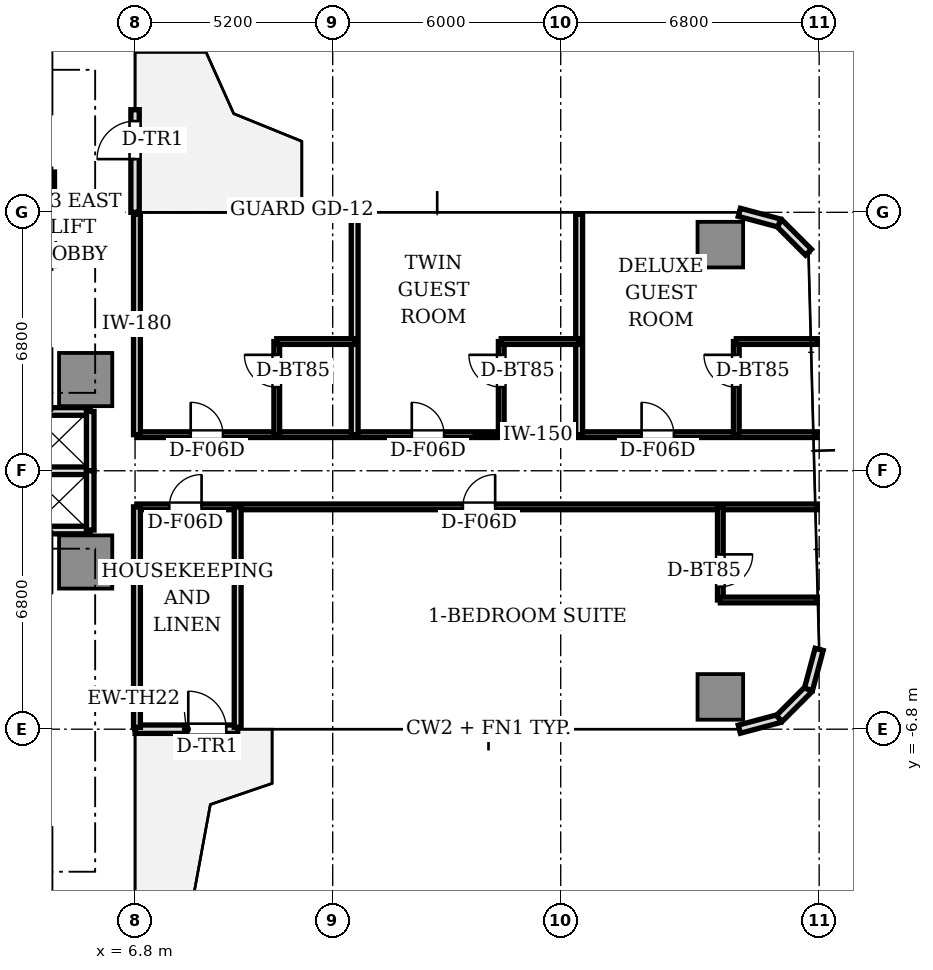
"""IFC4 building model, lengths in metres.
Left out: names, types, materials, properties, quantities, classifications, styles, units other than length and angle.
Written with IfcOpenShell. Run it as: python <this file> out.ifc"""

import sys

from ifc_helpers import new_model, si_unit, direction, frame, frame_2d, origin, origin_2d, place, context, subcontext, project, spatial, rectangle, extrude, source, transform, mapped, element, fill, save


model = new_model("IFC4")
c1 = context("Model", 3, precision=1e-05, world=origin(), true_north=direction((0.0, 1.0)))
c2 = subcontext(c1, "Body", "Model", "MODEL_VIEW")
j1 = project(units=[si_unit("LENGTHUNIT", "METRE"), si_unit("PLANEANGLEUNIT", "RADIAN")], contexts=[c1])
p1 = place(None, origin())
s1 = spatial("IfcSite", under=j1, at=p1, CompositionType="ELEMENT")
p2 = place(p1, origin())
s2 = spatial("IfcBuilding", under=s1, at=p2, CompositionType="ELEMENT")
p3 = place(p2, frame((0.0, 0.0, 51.05)))
s3 = spatial("IfcBuildingStorey", under=s2, at=p3, CompositionType="ELEMENT", Elevation=51.05)
m1 = source(origin(), c2, "Body", "SweptSolid", [
    extrude(rectangle(XDim=1.4, YDim=1.4, at=origin_2d()), origin(), (0.0, 0.0, 1.0), 3.11),
])
for number, where, z_axis, x_axis in (
    (1, (5.5, 2.4, 0.0), (0.0, 0.0, 1.0), (1.0, 0.0, 0.0)),
    (2, (5.5, -2.4, 0.0), (0.0, 0.0, 1.0), (1.0, 0.0, 0.0)),
):
    element("IfcColumn", number, at=place(p3, frame(where, z_axis=z_axis, x_axis=x_axis)), inside=s3, PredefinedType="COLUMN", context=c2, shape_type="MappedRepresentation", body=[
        mapped(m1, transform((0.0, 0.0, 0.0), scale=1.0)),
    ])
m2 = source(origin(), c2, "Body", "SweptSolid", [
    extrude(rectangle(XDim=1.2, YDim=1.2, at=origin_2d()), origin(), (0.0, 0.0, 1.0), 3.11),
])
for number, where, z_axis, x_axis in (
    (3, (22.2, -5.95, 0.0), (0.0, 0.0, 1.0), (1.0, 0.0, 0.0)),
    (4, (22.2, 5.95, 0.0), (0.0, 0.0, 1.0), (1.0, 0.0, 0.0)),
):
    element("IfcColumn", number, at=place(p3, frame(where, z_axis=z_axis, x_axis=x_axis)), inside=s3, PredefinedType="COLUMN", context=c2, shape_type="MappedRepresentation", body=[
        mapped(m2, transform((0.0, 0.0, 0.0), scale=1.0)),
    ])
p4 = place(p3, frame((6.8, -6.8, 0.0), z_axis=(0.0, 0.0, 1.0), x_axis=(1.0, 0.0, 0.0)))
e5 = element("IfcWall", 5, at=p4, inside=s3, PredefinedType="STANDARD", context=c2, shape_type="SweptSolid", body=[
    extrude(rectangle(XDim=2.7, YDim=0.22, at=frame_2d((1.35, 0.0))), origin(), (0.0, 0.0, 1.0), 3.11),
])
p5 = place(p4, frame((1.4, 0.0, 0.0)))
e6 = element("IfcOpeningElement", 6, at=p5, cuts=e5, PredefinedType="OPENING", context=c2, shape_type="SweptSolid", body=[
    extrude(rectangle(XDim=1.0, YDim=2.2, at=frame_2d((0.5, 1.1))), frame((0.0, 0.12, 0.0), z_axis=(0.0, -1.0, 0.0), x_axis=(1.0, 0.0, 0.0)), (0.0, 0.0, 1.0), 0.24),
])
for number, where, z_axis, x_axis in (
    (7, (22.7, -6.8, 0.0), (0.0, 0.0, 1.0), (0.966, 0.259, 0.0)),
    (8, (23.75, -6.519, 0.0), (0.0, 0.0, 1.0), (0.707, 0.707, 0.0)),
    (9, (24.519, -5.75, 0.0), (0.0, 0.0, 1.0), (0.259, 0.966, 0.0)),
    (10, (24.519, 5.75, 0.0), (0.0, 0.0, 1.0), (-0.707, 0.707, 0.0)),
    (11, (23.75, 6.519, 0.0), (0.0, 0.0, 1.0), (-0.966, 0.259, 0.0)),
):
    element("IfcWall", number, at=place(p3, frame(where, z_axis=z_axis, x_axis=x_axis)), inside=s3, PredefinedType="STANDARD", context=c2, shape_type="SweptSolid", body=[
        extrude(rectangle(XDim=1.087, YDim=0.22, at=frame_2d((0.543, 0.0))), origin(), (0.0, 0.0, 1.0), 3.11),
    ])
p6 = place(p3, frame((6.8, 6.8, 0.0), z_axis=(0.0, 0.0, 1.0), x_axis=(0.0, 1.0, 0.0)))
e12 = element("IfcWall", 12, at=p6, inside=s3, PredefinedType="STANDARD", context=c2, shape_type="SweptSolid", body=[
    extrude(rectangle(XDim=2.7, YDim=0.22, at=frame_2d((1.35, 0.0))), origin(), (0.0, 0.0, 1.0), 3.11),
])
p7 = place(p6, frame((1.4, 0.0, 0.0)))
e13 = element("IfcOpeningElement", 13, at=p7, cuts=e12, PredefinedType="OPENING", context=c2, shape_type="SweptSolid", body=[
    extrude(rectangle(XDim=1.0, YDim=2.2, at=frame_2d((0.5, 1.1))), frame((0.0, 0.12, 0.0), z_axis=(0.0, -1.0, 0.0), x_axis=(1.0, 0.0, 0.0)), (0.0, 0.0, 1.0), 0.24),
])
for number, where, z_axis, x_axis in (
    (14, (3.98, 1.56, 0.0), (0.0, 0.0, 1.0), (1.0, 0.0, 0.0)),
    (15, (3.98, -1.56, 0.0), (0.0, 0.0, 1.0), (1.0, 0.0, 0.0)),
    (16, (3.98, 0.0, 0.0), (0.0, 0.0, 1.0), (1.0, 0.0, 0.0)),
):
    element("IfcWall", number, at=place(p3, frame(where, z_axis=z_axis, x_axis=x_axis)), inside=s3, PredefinedType="SOLIDWALL", context=c2, shape_type="SweptSolid", body=[
        extrude(rectangle(XDim=1.64, YDim=0.2, at=frame_2d((0.82, 0.0))), origin(), (0.0, 0.0, 1.0), 2.66),
    ])
for number, where, z_axis, x_axis in (
    (17, (5.62, 0.0, 0.0), (0.0, 0.0, 1.0), (0.0, 1.0, 0.0)),
    (18, (5.62, -1.56, 0.0), (0.0, 0.0, 1.0), (0.0, 1.0, 0.0)),
):
    element("IfcWall", number, at=place(p3, frame(where, z_axis=z_axis, x_axis=x_axis)), inside=s3, PredefinedType="SOLIDWALL", context=c2, shape_type="SweptSolid", body=[
        extrude(rectangle(XDim=1.56, YDim=0.2, at=frame_2d((0.78, 0.0))), origin(), (0.0, 0.0, 1.0), 2.66),
    ])
p8 = place(p3, frame((4.58, 5.4, 0.0), z_axis=(0.0, 0.0, 1.0), x_axis=(0.0, 1.0, 0.0)))
e19 = element("IfcWall", 19, at=p8, inside=s3, PredefinedType="SOLIDWALL", context=c2, shape_type="SweptSolid", body=[
    extrude(rectangle(XDim=2.46, YDim=0.2, at=frame_2d((1.23, 0.0))), origin(), (0.0, 0.0, 1.0), 2.66),
])
p9 = place(p8, frame((0.55, 0.0, 0.0)))
e20 = element("IfcOpeningElement", 20, at=p9, cuts=e19, PredefinedType="OPENING", context=c2, shape_type="SweptSolid", body=[
    extrude(rectangle(XDim=0.85, YDim=2.1, at=frame_2d((0.425, 1.05))), frame((0.0, 0.11, 0.0), z_axis=(0.0, -1.0, 0.0), x_axis=(1.0, 0.0, 0.0)), (0.0, 0.0, 1.0), 0.22),
])
p10 = place(p3, frame((6.85, 0.95, 0.0), z_axis=(0.0, 0.0, 1.0), x_axis=(1.0, 0.0, 0.0)))
e21 = element("IfcWall", 21, at=p10, inside=s3, PredefinedType="PARTITIONING", context=c2, shape_type="SweptSolid", body=[
    extrude(rectangle(XDim=17.9, YDim=0.15, at=frame_2d((8.95, 0.0))), origin(), (0.0, 0.0, 1.0), 2.66),
])
p11 = place(p10, frame((1.414, 0.0, 0.0)))
e22 = element("IfcOpeningElement", 22, at=p11, cuts=e21, PredefinedType="OPENING", context=c2, shape_type="SweptSolid", body=[
    extrude(rectangle(XDim=0.85, YDim=2.1, at=frame_2d((0.425, 1.05))), frame((0.0, 0.085, 0.0), z_axis=(0.0, -1.0, 0.0), x_axis=(1.0, 0.0, 0.0)), (0.0, 0.0, 1.0), 0.17),
])
p12 = place(p10, frame((7.231, 0.0, 0.0)))
e23 = element("IfcOpeningElement", 23, at=p12, cuts=e21, PredefinedType="OPENING", context=c2, shape_type="SweptSolid", body=[
    extrude(rectangle(XDim=0.85, YDim=2.1, at=frame_2d((0.425, 1.05))), frame((0.0, 0.085, 0.0), z_axis=(0.0, -1.0, 0.0), x_axis=(1.0, 0.0, 0.0)), (0.0, 0.0, 1.0), 0.17),
])
p13 = place(p10, frame((13.278, 0.0, 0.0)))
e24 = element("IfcOpeningElement", 24, at=p13, cuts=e21, PredefinedType="OPENING", context=c2, shape_type="SweptSolid", body=[
    extrude(rectangle(XDim=0.85, YDim=2.1, at=frame_2d((0.425, 1.05))), frame((0.0, 0.085, 0.0), z_axis=(0.0, -1.0, 0.0), x_axis=(1.0, 0.0, 0.0)), (0.0, 0.0, 1.0), 0.17),
])
p14 = place(p3, frame((6.85, -0.95, 0.0), z_axis=(0.0, 0.0, 1.0), x_axis=(1.0, 0.0, 0.0)))
e25 = element("IfcWall", 25, at=p14, inside=s3, PredefinedType="PARTITIONING", context=c2, shape_type="SweptSolid", body=[
    extrude(rectangle(XDim=17.9, YDim=0.15, at=frame_2d((8.95, 0.0))), origin(), (0.0, 0.0, 1.0), 2.66),
])
p15 = place(p14, frame((0.85, 0.0, 0.0)))
e26 = element("IfcOpeningElement", 26, at=p15, cuts=e25, PredefinedType="OPENING", context=c2, shape_type="SweptSolid", body=[
    extrude(rectangle(XDim=0.85, YDim=2.1, at=frame_2d((0.425, 1.05))), frame((0.0, 0.085, 0.0), z_axis=(0.0, -1.0, 0.0), x_axis=(1.0, 0.0, 0.0)), (0.0, 0.0, 1.0), 0.17),
])
p16 = place(p14, frame((8.575, 0.0, 0.0)))
e27 = element("IfcOpeningElement", 27, at=p16, cuts=e25, PredefinedType="OPENING", context=c2, shape_type="SweptSolid", body=[
    extrude(rectangle(XDim=0.85, YDim=2.1, at=frame_2d((0.425, 1.05))), frame((0.0, 0.085, 0.0), z_axis=(0.0, -1.0, 0.0), x_axis=(1.0, 0.0, 0.0)), (0.0, 0.0, 1.0), 0.17),
])
for number, where, z_axis, x_axis in (
    (28, (6.85, 0.95, 0.0), (0.0, 0.0, 1.0), (0.0, 1.0, 0.0)),
    (29, (6.85, -6.75, 0.0), (0.0, 0.0, 1.0), (0.0, 1.0, 0.0)),
    (30, (12.578, 0.95, 0.0), (0.0, 0.0, 1.0), (0.0, 1.0, 0.0)),
):
    element("IfcWall", number, at=place(p3, frame(where, z_axis=z_axis, x_axis=x_axis)), inside=s3, PredefinedType="PARTITIONING", context=c2, shape_type="SweptSolid", body=[
        extrude(rectangle(XDim=5.8, YDim=0.18, at=frame_2d((2.9, 0.0))), origin(), (0.0, 0.0, 1.0), 2.66),
    ])
p17 = place(p3, frame((10.528, 0.95, 0.0), z_axis=(0.0, 0.0, 1.0), x_axis=(0.0, 1.0, 0.0)))
e31 = element("IfcWall", 31, at=p17, inside=s3, PredefinedType="PARTITIONING", context=c2, shape_type="SweptSolid", body=[
    extrude(rectangle(XDim=2.45, YDim=0.15, at=frame_2d((1.225, 0.0))), origin(), (0.0, 0.0, 1.0), 2.66),
])
p18 = place(p17, frame((1.25, 0.0, 0.0)))
e32 = element("IfcOpeningElement", 32, at=p18, cuts=e31, PredefinedType="OPENING", context=c2, shape_type="SweptSolid", body=[
    extrude(rectangle(XDim=0.85, YDim=2.1, at=frame_2d((0.425, 1.05))), frame((0.0, 0.085, 0.0), z_axis=(0.0, -1.0, 0.0), x_axis=(1.0, 0.0, 0.0)), (0.0, 0.0, 1.0), 0.17),
])
p19 = place(p3, frame((10.528, 3.4, 0.0), z_axis=(0.0, 0.0, 1.0), x_axis=(1.0, 0.0, 0.0)))
e33 = element("IfcWall", 33, at=p19, inside=s3, PredefinedType="PARTITIONING", context=c2, shape_type="SweptSolid", body=[
    extrude(rectangle(XDim=2.05, YDim=0.15, at=frame_2d((1.025, 0.0))), origin(), (0.0, 0.0, 1.0), 2.63),
])
p20 = place(p3, frame((18.485, 0.95, 0.0), z_axis=(0.0, 0.0, 1.0), x_axis=(0.0, 1.0, 0.0)))
e34 = element("IfcWall", 34, at=p20, inside=s3, PredefinedType="PARTITIONING", context=c2, shape_type="SweptSolid", body=[
    extrude(rectangle(XDim=5.8, YDim=0.18, at=frame_2d((2.9, 0.0))), origin(), (0.0, 0.0, 1.0), 2.66),
])
p21 = place(p3, frame((16.435, 0.95, 0.0), z_axis=(0.0, 0.0, 1.0), x_axis=(0.0, 1.0, 0.0)))
e35 = element("IfcWall", 35, at=p21, inside=s3, PredefinedType="PARTITIONING", context=c2, shape_type="SweptSolid", body=[
    extrude(rectangle(XDim=2.45, YDim=0.15, at=frame_2d((1.225, 0.0))), origin(), (0.0, 0.0, 1.0), 2.66),
])
p22 = place(p21, frame((1.25, 0.0, 0.0)))
e36 = element("IfcOpeningElement", 36, at=p22, cuts=e35, PredefinedType="OPENING", context=c2, shape_type="SweptSolid", body=[
    extrude(rectangle(XDim=0.85, YDim=2.1, at=frame_2d((0.425, 1.05))), frame((0.0, 0.085, 0.0), z_axis=(0.0, -1.0, 0.0), x_axis=(1.0, 0.0, 0.0)), (0.0, 0.0, 1.0), 0.17),
])
p23 = place(p3, frame((16.435, 3.4, 0.0), z_axis=(0.0, 0.0, 1.0), x_axis=(1.0, 0.0, 0.0)))
e37 = element("IfcWall", 37, at=p23, inside=s3, PredefinedType="PARTITIONING", context=c2, shape_type="SweptSolid", body=[
    extrude(rectangle(XDim=2.05, YDim=0.15, at=frame_2d((1.025, 0.0))), origin(), (0.0, 0.0, 1.0), 2.63),
])
p24 = place(p3, frame((22.62, 0.95, 0.0), z_axis=(0.0, 0.0, 1.0), x_axis=(0.0, 1.0, 0.0)))
e38 = element("IfcWall", 38, at=p24, inside=s3, PredefinedType="PARTITIONING", context=c2, shape_type="SweptSolid", body=[
    extrude(rectangle(XDim=2.45, YDim=0.15, at=frame_2d((1.225, 0.0))), origin(), (0.0, 0.0, 1.0), 2.66),
])
p25 = place(p24, frame((1.25, 0.0, 0.0)))
e39 = element("IfcOpeningElement", 39, at=p25, cuts=e38, PredefinedType="OPENING", context=c2, shape_type="SweptSolid", body=[
    extrude(rectangle(XDim=0.85, YDim=2.1, at=frame_2d((0.425, 1.05))), frame((0.0, 0.085, 0.0), z_axis=(0.0, -1.0, 0.0), x_axis=(1.0, 0.0, 0.0)), (0.0, 0.0, 1.0), 0.17),
])
p26 = place(p3, frame((22.62, 3.4, 0.0), z_axis=(0.0, 0.0, 1.0), x_axis=(1.0, 0.0, 0.0)))
e40 = element("IfcWall", 40, at=p26, inside=s3, PredefinedType="PARTITIONING", context=c2, shape_type="SweptSolid", body=[
    extrude(rectangle(XDim=2.13, YDim=0.15, at=frame_2d((1.065, 0.0))), origin(), (0.0, 0.0, 1.0), 2.66),
])
p27 = place(p3, frame((9.5, -0.95, 0.0), z_axis=(0.0, 0.0, 1.0), x_axis=(0.0, -1.0, 0.0)))
e41 = element("IfcWall", 41, at=p27, inside=s3, PredefinedType="PARTITIONING", context=c2, shape_type="SweptSolid", body=[
    extrude(rectangle(XDim=5.8, YDim=0.18, at=frame_2d((2.9, 0.0))), origin(), (0.0, 0.0, 1.0), 2.66),
])
p28 = place(p3, frame((22.2, -0.95, 0.0), z_axis=(0.0, 0.0, 1.0), x_axis=(0.0, -1.0, 0.0)))
e42 = element("IfcWall", 42, at=p28, inside=s3, PredefinedType="PARTITIONING", context=c2, shape_type="SweptSolid", body=[
    extrude(rectangle(XDim=2.45, YDim=0.15, at=frame_2d((1.225, 0.0))), origin(), (0.0, 0.0, 1.0), 2.58),
])
p29 = place(p28, frame((1.25, 0.0, 0.0)))
e43 = element("IfcOpeningElement", 43, at=p29, cuts=e42, PredefinedType="OPENING", context=c2, shape_type="SweptSolid", body=[
    extrude(rectangle(XDim=0.85, YDim=2.1, at=frame_2d((0.425, 1.05))), frame((0.0, 0.085, 0.0), z_axis=(0.0, -1.0, 0.0), x_axis=(1.0, 0.0, 0.0)), (0.0, 0.0, 1.0), 0.17),
])
p30 = place(p3, frame((22.2, -3.4, 0.0), z_axis=(0.0, 0.0, 1.0), x_axis=(1.0, 0.0, 0.0)))
e44 = element("IfcWall", 44, at=p30, inside=s3, PredefinedType="PARTITIONING", context=c2, shape_type="SweptSolid", body=[
    extrude(rectangle(XDim=2.55, YDim=0.15, at=frame_2d((1.275, 0.0))), origin(), (0.0, 0.0, 1.0), 2.66),
])
m3 = source(origin(), c2, "Body", "SweptSolid", [
    extrude(rectangle(XDim=1.0, YDim=0.05, at=origin_2d()), origin(), (0.0, 0.0, 1.0), 2.2),
])
p31 = place(p5, frame((0.5, 0.0, 0.0)))
e45 = element("IfcDoor", 45, at=p31, inside=s3, OperationType="SINGLE_SWING_LEFT", PredefinedType="DOOR", context=c2, shape_type="MappedRepresentation", body=[
    mapped(m3, transform((0.0, 0.0, 0.0), scale=1.0)),
])
fill(e6, e45)
p32 = place(p7, frame((0.5, 0.0, 0.0)))
e46 = element("IfcDoor", 46, at=p32, inside=s3, OperationType="SINGLE_SWING_LEFT", PredefinedType="DOOR", context=c2, shape_type="MappedRepresentation", body=[
    mapped(m3, transform((0.0, 0.0, 0.0), scale=1.0)),
])
fill(e13, e46)
m4 = source(origin(), c2, "Body", "SweptSolid", [
    extrude(rectangle(XDim=0.85, YDim=0.05, at=origin_2d()), origin(), (0.0, 0.0, 1.0), 2.1),
])
p33 = place(p18, frame((0.425, 0.0, 0.0)))
e47 = element("IfcDoor", 47, at=p33, inside=s3, OperationType="SINGLE_SWING_RIGHT", PredefinedType="DOOR", context=c2, shape_type="MappedRepresentation", body=[
    mapped(m4, transform((0.0, 0.0, 0.0), scale=1.0)),
])
fill(e32, e47)
p34 = place(p11, frame((0.425, 0.0, 0.0)))
e48 = element("IfcDoor", 48, at=p34, inside=s3, OperationType="SINGLE_SWING_LEFT", PredefinedType="DOOR", context=c2, shape_type="MappedRepresentation", body=[
    mapped(m4, transform((0.0, 0.0, 0.0), scale=1.0)),
])
fill(e22, e48)
p35 = place(p22, frame((0.425, 0.0, 0.0)))
e49 = element("IfcDoor", 49, at=p35, inside=s3, OperationType="SINGLE_SWING_RIGHT", PredefinedType="DOOR", context=c2, shape_type="MappedRepresentation", body=[
    mapped(m4, transform((0.0, 0.0, 0.0), scale=1.0)),
])
fill(e36, e49)
p36 = place(p12, frame((0.425, 0.0, 0.0)))
e50 = element("IfcDoor", 50, at=p36, inside=s3, OperationType="SINGLE_SWING_LEFT", PredefinedType="DOOR", context=c2, shape_type="MappedRepresentation", body=[
    mapped(m4, transform((0.0, 0.0, 0.0), scale=1.0)),
])
fill(e23, e50)
p37 = place(p25, frame((0.425, 0.0, 0.0)))
e51 = element("IfcDoor", 51, at=p37, inside=s3, OperationType="SINGLE_SWING_RIGHT", PredefinedType="DOOR", context=c2, shape_type="MappedRepresentation", body=[
    mapped(m4, transform((0.0, 0.0, 0.0), scale=1.0)),
])
fill(e39, e51)
p38 = place(p13, frame((0.425, 0.0, 0.0)))
e52 = element("IfcDoor", 52, at=p38, inside=s3, OperationType="SINGLE_SWING_LEFT", PredefinedType="DOOR", context=c2, shape_type="MappedRepresentation", body=[
    mapped(m4, transform((0.0, 0.0, 0.0), scale=1.0)),
])
fill(e24, e52)
p39 = place(p15, frame((0.425, 0.0, 0.0)))
e53 = element("IfcDoor", 53, at=p39, inside=s3, OperationType="SINGLE_SWING_RIGHT", PredefinedType="DOOR", context=c2, shape_type="MappedRepresentation", body=[
    mapped(m4, transform((0.0, 0.0, 0.0), scale=1.0)),
])
fill(e26, e53)
p40 = place(p29, frame((0.425, 0.0, 0.0)))
e54 = element("IfcDoor", 54, at=p40, inside=s3, OperationType="SINGLE_SWING_LEFT", PredefinedType="DOOR", context=c2, shape_type="MappedRepresentation", body=[
    mapped(m4, transform((0.0, 0.0, 0.0), scale=1.0)),
])
fill(e43, e54)
p41 = place(p16, frame((0.425, 0.0, 0.0)))
e55 = element("IfcDoor", 55, at=p41, inside=s3, OperationType="SINGLE_SWING_RIGHT", PredefinedType="DOOR", context=c2, shape_type="MappedRepresentation", body=[
    mapped(m4, transform((0.0, 0.0, 0.0), scale=1.0)),
])
fill(e27, e55)
save(model, sys.argv[1])
